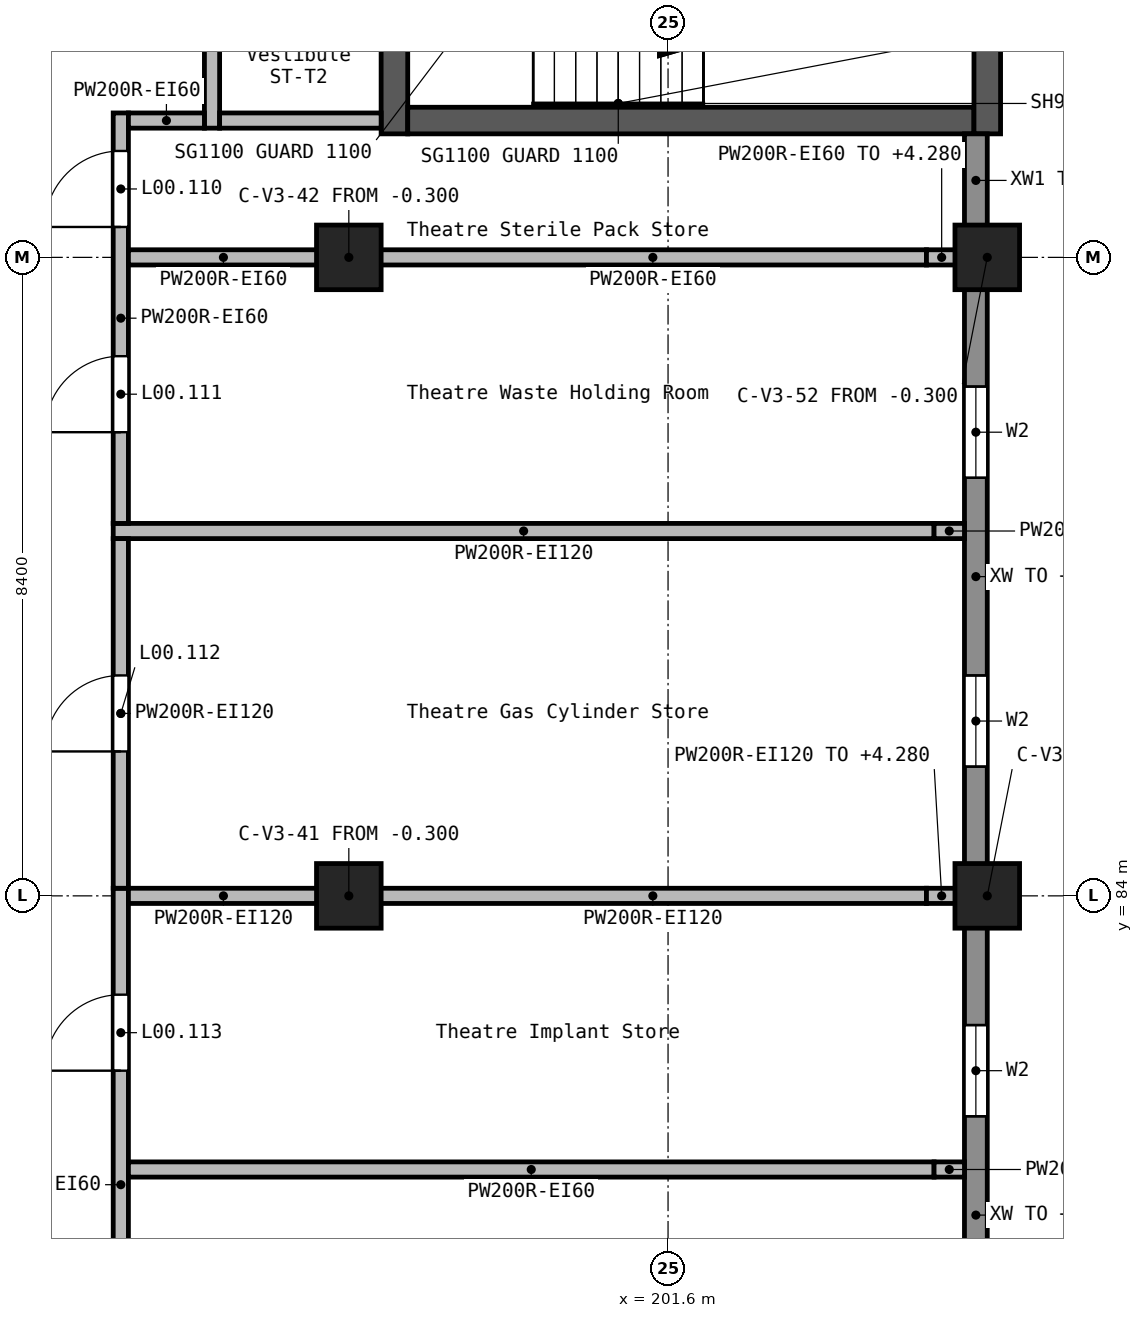
"""IFC4 building model, lengths in metres.
Left out: names, types, materials, properties, quantities, classifications, styles, units other than length and angle.
Written with IfcOpenShell. Run it as: python <this file> out.ifc"""

import sys

from ifc_helpers import new_model, si_unit, direction, frame, frame_2d, origin, origin_2d, place, context, subcontext, project, spatial, rectangle, extrude, element, fill, save


model = new_model("IFC4")
c1 = context("Model", 3, precision=1e-05, world=origin(), true_north=direction((0.0, 1.0)))
c2 = subcontext(c1, "Body", "Model", "MODEL_VIEW")
j1 = project(units=[si_unit("LENGTHUNIT", "METRE"), si_unit("PLANEANGLEUNIT", "RADIAN")], contexts=[c1])
p1 = place(None, origin())
s1 = spatial("IfcSite", under=j1, at=p1, CompositionType="ELEMENT")
p2 = place(p1, origin())
s2 = spatial("IfcBuilding", under=s1, at=p2, CompositionType="ELEMENT")
p3 = place(p2, origin())
s3 = spatial("IfcBuildingStorey", under=s2, at=p3, CompositionType="ELEMENT", Elevation=0.0)
for number, where, z_axis, x_axis in (
    (1, (197.4, 84.0, -0.3), (0.0, 0.0, 1.0), (1.0, 0.0, 0.0)),
    (2, (197.4, 92.4, -0.3), (0.0, 0.0, 1.0), (1.0, 0.0, 0.0)),
    (3, (205.8, 84.0, -0.3), (0.0, 0.0, 1.0), (1.0, 0.0, 0.0)),
    (4, (205.8, 92.4, -0.3), (0.0, 0.0, 1.0), (1.0, 0.0, 0.0)),
):
    element("IfcColumn", number, at=place(p3, frame(where, z_axis=z_axis, x_axis=x_axis)), inside=s3, PredefinedType="COLUMN", context=c2, shape_type="SweptSolid", body=[
        extrude(rectangle(XDim=0.85, YDim=0.85, at=origin_2d()), origin(), (0.0, 0.0, 1.0), 5.7),
    ])
p4 = place(p3, frame((198.0, 94.025, -0.3), z_axis=(0.0, 0.0, 1.0), x_axis=(0.0, 1.0, 0.0)))
e5 = element("IfcWall", 5, at=p4, inside=s3, PredefinedType="SHEAR", context=c2, shape_type="SweptSolid", body=[
    extrude(rectangle(XDim=4.8, YDim=0.35, at=frame_2d((2.4, 0.0))), origin(), (0.0, 0.0, 1.0), 5.7),
])
p5 = place(p4, frame((3.275, 0.0, 0.3)))
e6 = element("IfcOpeningElement", 6, at=p5, cuts=e5, PredefinedType="OPENING", context=c2, shape_type="SweptSolid", body=[
    extrude(rectangle(XDim=1.1, YDim=2.1, at=frame_2d((0.55, 1.05))), frame((0.0, 0.185, 0.0), z_axis=(0.0, -1.0, 0.0), x_axis=(1.0, 0.0, 0.0)), (0.0, 0.0, 1.0), 0.37),
])
p6 = place(p3, frame((198.175, 94.2, -0.3), z_axis=(0.0, 0.0, 1.0), x_axis=(1.0, 0.0, 0.0)))
e7 = element("IfcWall", 7, at=p6, inside=s3, PredefinedType="SHEAR", context=c2, shape_type="SweptSolid", body=[
    extrude(rectangle(XDim=7.45, YDim=0.35, at=frame_2d((3.725, 0.0))), origin(), (0.0, 0.0, 1.0), 5.7),
])
p7 = place(p3, frame((205.8, 94.025, -0.3), z_axis=(0.0, 0.0, 1.0), x_axis=(0.0, 1.0, 0.0)))
e8 = element("IfcWall", 8, at=p7, inside=s3, PredefinedType="SHEAR", context=c2, shape_type="SweptSolid", body=[
    extrude(rectangle(XDim=5.15, YDim=0.35, at=frame_2d((2.575, 0.0))), origin(), (0.0, 0.0, 1.0), 5.7),
])
p8 = place(p7, frame((1.875, 0.0, 0.3)))
e9 = element("IfcOpeningElement", 9, at=p8, cuts=e8, PredefinedType="OPENING", context=c2, shape_type="SweptSolid", body=[
    extrude(rectangle(XDim=1.4, YDim=2.1, at=frame_2d((0.7, 1.05))), frame((0.0, 0.185, 0.0), z_axis=(0.0, -1.0, 0.0), x_axis=(1.0, 0.0, 0.0)), (0.0, 0.0, 1.0), 0.37),
])
p9 = place(p3, frame((205.65, 76.0, 0.0), z_axis=(0.0, 0.0, 1.0), x_axis=(0.0, 1.0, 0.0)))
e10 = element("IfcWall", 10, at=p9, inside=s3, PredefinedType="STANDARD", context=c2, shape_type="SweptSolid", body=[
    extrude(rectangle(XDim=7.6, YDim=0.3, at=frame_2d((3.8, 0.0))), origin(), (0.0, 0.0, 1.0), 4.25),
])
p10 = place(p9, frame((1.3, 0.0, 1.2)))
e11 = element("IfcOpeningElement", 11, at=p10, cuts=e10, PredefinedType="OPENING", context=c2, shape_type="SweptSolid", body=[
    extrude(rectangle(XDim=1.2, YDim=1.2, at=frame_2d((0.6, 0.6))), frame((0.0, 0.16, 0.0), z_axis=(0.0, -1.0, 0.0), x_axis=(1.0, 0.0, 0.0)), (0.0, 0.0, 1.0), 0.32),
])
p11 = place(p9, frame((5.1, 0.0, 1.2)))
e12 = element("IfcOpeningElement", 12, at=p11, cuts=e10, PredefinedType="OPENING", context=c2, shape_type="SweptSolid", body=[
    extrude(rectangle(XDim=1.2, YDim=1.2, at=frame_2d((0.6, 0.6))), frame((0.0, 0.16, 0.0), z_axis=(0.0, -1.0, 0.0), x_axis=(1.0, 0.0, 0.0)), (0.0, 0.0, 1.0), 0.32),
])
p12 = place(p3, frame((205.65, 84.4, 0.0), z_axis=(0.0, 0.0, 1.0), x_axis=(0.0, 1.0, 0.0)))
e13 = element("IfcWall", 13, at=p12, inside=s3, PredefinedType="STANDARD", context=c2, shape_type="SweptSolid", body=[
    extrude(rectangle(XDim=7.6, YDim=0.3, at=frame_2d((3.8, 0.0))), origin(), (0.0, 0.0, 1.0), 4.25),
])
p13 = place(p12, frame((1.3, 0.0, 1.2)))
e14 = element("IfcOpeningElement", 14, at=p13, cuts=e13, PredefinedType="OPENING", context=c2, shape_type="SweptSolid", body=[
    extrude(rectangle(XDim=1.2, YDim=1.2, at=frame_2d((0.6, 0.6))), frame((0.0, 0.16, 0.0), z_axis=(0.0, -1.0, 0.0), x_axis=(1.0, 0.0, 0.0)), (0.0, 0.0, 1.0), 0.32),
])
p14 = place(p12, frame((5.1, 0.0, 1.2)))
e15 = element("IfcOpeningElement", 15, at=p14, cuts=e13, PredefinedType="OPENING", context=c2, shape_type="SweptSolid", body=[
    extrude(rectangle(XDim=1.2, YDim=1.2, at=frame_2d((0.6, 0.6))), frame((0.0, 0.16, 0.0), z_axis=(0.0, -1.0, 0.0), x_axis=(1.0, 0.0, 0.0)), (0.0, 0.0, 1.0), 0.32),
])
p15 = place(p3, frame((205.65, 92.8, 0.0), z_axis=(0.0, 0.0, 1.0), x_axis=(0.0, 1.0, 0.0)))
e16 = element("IfcWall", 16, at=p15, inside=s3, PredefinedType="STANDARD", context=c2, shape_type="SweptSolid", body=[
    extrude(rectangle(XDim=1.225, YDim=0.3, at=frame_2d((0.612, 0.0))), origin(), (0.0, 0.0, 1.0), 4.25),
])
p16 = place(p3, frame((194.4, 76.3, 0.0), z_axis=(0.0, 0.0, 1.0), x_axis=(0.0, 1.0, 0.0)))
e17 = element("IfcWall", 17, at=p16, inside=s3, PredefinedType="SOLIDWALL", context=c2, shape_type="SweptSolid", body=[
    extrude(rectangle(XDim=7.8, YDim=0.2, at=frame_2d((3.9, 0.0))), origin(), (0.0, 0.0, 1.0), 5.05),
])
p17 = place(p16, frame((5.4, 0.0, 0.0)))
e18 = element("IfcOpeningElement", 18, at=p17, cuts=e17, PredefinedType="OPENING", context=c2, shape_type="SweptSolid", body=[
    extrude(rectangle(XDim=1.0, YDim=2.1, at=frame_2d((0.5, 1.05))), frame((0.0, 0.11, 0.0), z_axis=(0.0, -1.0, 0.0), x_axis=(1.0, 0.0, 0.0)), (0.0, 0.0, 1.0), 0.22),
])
p18 = place(p16, frame((1.2, 0.0, 0.0)))
e19 = element("IfcOpeningElement", 19, at=p18, cuts=e17, PredefinedType="OPENING", context=c2, shape_type="SweptSolid", body=[
    extrude(rectangle(XDim=1.0, YDim=2.1, at=frame_2d((0.5, 1.05))), frame((0.0, 0.11, 0.0), z_axis=(0.0, -1.0, 0.0), x_axis=(1.0, 0.0, 0.0)), (0.0, 0.0, 1.0), 0.22),
])
p19 = place(p3, frame((194.5, 80.4, 0.0), z_axis=(0.0, 0.0, 1.0), x_axis=(1.0, 0.0, 0.0)))
e20 = element("IfcWall", 20, at=p19, inside=s3, PredefinedType="SOLIDWALL", context=c2, shape_type="SweptSolid", body=[
    extrude(rectangle(XDim=10.6, YDim=0.2, at=frame_2d((5.3, 0.0))), origin(), (0.0, 0.0, 1.0), 5.05),
])
p20 = place(p3, frame((205.1, 80.4, 0.0), z_axis=(0.0, 0.0, 1.0), x_axis=(1.0, 0.0, 0.0)))
e21 = element("IfcWall", 21, at=p20, inside=s3, PredefinedType="SOLIDWALL", context=c2, shape_type="SweptSolid", body=[
    extrude(rectangle(XDim=0.4, YDim=0.2, at=frame_2d((0.2, 0.0))), origin(), (0.0, 0.0, 1.0), 4.28),
])
p21 = place(p3, frame((194.5, 84.0, 0.0), z_axis=(0.0, 0.0, 1.0), x_axis=(1.0, 0.0, 0.0)))
e22 = element("IfcWall", 22, at=p21, inside=s3, PredefinedType="SOLIDWALL", context=c2, shape_type="SweptSolid", body=[
    extrude(rectangle(XDim=2.5, YDim=0.2, at=frame_2d((1.25, 0.0))), origin(), (0.0, 0.0, 1.0), 5.05),
])
p22 = place(p3, frame((197.8, 84.0, 0.0), z_axis=(0.0, 0.0, 1.0), x_axis=(1.0, 0.0, 0.0)))
e23 = element("IfcWall", 23, at=p22, inside=s3, PredefinedType="SOLIDWALL", context=c2, shape_type="SweptSolid", body=[
    extrude(rectangle(XDim=7.2, YDim=0.2, at=frame_2d((3.6, 0.0))), origin(), (0.0, 0.0, 1.0), 5.05),
])
p23 = place(p3, frame((205.0, 84.0, 0.0), z_axis=(0.0, 0.0, 1.0), x_axis=(1.0, 0.0, 0.0)))
e24 = element("IfcWall", 24, at=p23, inside=s3, PredefinedType="SOLIDWALL", context=c2, shape_type="SweptSolid", body=[
    extrude(rectangle(XDim=0.4, YDim=0.2, at=frame_2d((0.2, 0.0))), origin(), (0.0, 0.0, 1.0), 4.28),
])
p24 = place(p3, frame((194.3, 88.8, 0.0), z_axis=(0.0, 0.0, 1.0), x_axis=(1.0, 0.0, 0.0)))
e25 = element("IfcWall", 25, at=p24, inside=s3, PredefinedType="SOLIDWALL", context=c2, shape_type="SweptSolid", body=[
    extrude(rectangle(XDim=10.8, YDim=0.2, at=frame_2d((5.4, 0.0))), origin(), (0.0, 0.0, 1.0), 5.05),
])
p25 = place(p3, frame((205.1, 88.8, 0.0), z_axis=(0.0, 0.0, 1.0), x_axis=(1.0, 0.0, 0.0)))
e26 = element("IfcWall", 26, at=p25, inside=s3, PredefinedType="SOLIDWALL", context=c2, shape_type="SweptSolid", body=[
    extrude(rectangle(XDim=0.4, YDim=0.2, at=frame_2d((0.2, 0.0))), origin(), (0.0, 0.0, 1.0), 4.28),
])
p26 = place(p3, frame((194.4, 88.9, 0.0), z_axis=(0.0, 0.0, 1.0), x_axis=(0.0, 1.0, 0.0)))
e27 = element("IfcWall", 27, at=p26, inside=s3, PredefinedType="SOLIDWALL", context=c2, shape_type="SweptSolid", body=[
    extrude(rectangle(XDim=5.4, YDim=0.2, at=frame_2d((2.7, 0.0))), origin(), (0.0, 0.0, 1.0), 5.05),
])
p27 = place(p26, frame((3.9, 0.0, 0.0)))
e28 = element("IfcOpeningElement", 28, at=p27, cuts=e27, PredefinedType="OPENING", context=c2, shape_type="SweptSolid", body=[
    extrude(rectangle(XDim=1.0, YDim=2.1, at=frame_2d((0.5, 1.05))), frame((0.0, 0.11, 0.0), z_axis=(0.0, -1.0, 0.0), x_axis=(1.0, 0.0, 0.0)), (0.0, 0.0, 1.0), 0.22),
])
p28 = place(p26, frame((1.2, 0.0, 0.0)))
e29 = element("IfcOpeningElement", 29, at=p28, cuts=e27, PredefinedType="OPENING", context=c2, shape_type="SweptSolid", body=[
    extrude(rectangle(XDim=1.0, YDim=2.1, at=frame_2d((0.5, 1.05))), frame((0.0, 0.11, 0.0), z_axis=(0.0, -1.0, 0.0), x_axis=(1.0, 0.0, 0.0)), (0.0, 0.0, 1.0), 0.22),
])
p29 = place(p3, frame((194.5, 92.4, 0.0), z_axis=(0.0, 0.0, 1.0), x_axis=(1.0, 0.0, 0.0)))
e30 = element("IfcWall", 30, at=p29, inside=s3, PredefinedType="SOLIDWALL", context=c2, shape_type="SweptSolid", body=[
    extrude(rectangle(XDim=2.5, YDim=0.2, at=frame_2d((1.25, 0.0))), origin(), (0.0, 0.0, 1.0), 5.05),
])
p30 = place(p3, frame((197.8, 92.4, 0.0), z_axis=(0.0, 0.0, 1.0), x_axis=(1.0, 0.0, 0.0)))
e31 = element("IfcWall", 31, at=p30, inside=s3, PredefinedType="SOLIDWALL", context=c2, shape_type="SweptSolid", body=[
    extrude(rectangle(XDim=7.2, YDim=0.2, at=frame_2d((3.6, 0.0))), origin(), (0.0, 0.0, 1.0), 5.05),
])
p31 = place(p3, frame((205.0, 92.4, 0.0), z_axis=(0.0, 0.0, 1.0), x_axis=(1.0, 0.0, 0.0)))
e32 = element("IfcWall", 32, at=p31, inside=s3, PredefinedType="SOLIDWALL", context=c2, shape_type="SweptSolid", body=[
    extrude(rectangle(XDim=0.4, YDim=0.2, at=frame_2d((0.2, 0.0))), origin(), (0.0, 0.0, 1.0), 4.28),
])
p32 = place(p3, frame((194.4, 84.1, 0.0), z_axis=(0.0, 0.0, 1.0), x_axis=(0.0, 1.0, 0.0)))
e33 = element("IfcWall", 33, at=p32, inside=s3, PredefinedType="SOLIDWALL", context=c2, shape_type="SweptSolid", body=[
    extrude(rectangle(XDim=4.6, YDim=0.2, at=frame_2d((2.3, 0.0))), origin(), (0.0, 0.0, 1.0), 5.05),
])
p33 = place(p32, frame((1.8, 0.0, 0.0)))
e34 = element("IfcOpeningElement", 34, at=p33, cuts=e33, PredefinedType="OPENING", context=c2, shape_type="SweptSolid", body=[
    extrude(rectangle(XDim=1.0, YDim=2.1, at=frame_2d((0.5, 1.05))), frame((0.0, 0.11, 0.0), z_axis=(0.0, -1.0, 0.0), x_axis=(1.0, 0.0, 0.0)), (0.0, 0.0, 1.0), 0.22),
])
p34 = place(p3, frame((195.6, 94.1, 0.0), z_axis=(0.0, 0.0, 1.0), x_axis=(0.0, 1.0, 0.0)))
e35 = element("IfcWall", 35, at=p34, inside=s3, PredefinedType="SOLIDWALL", context=c2, shape_type="SweptSolid", body=[
    extrude(rectangle(XDim=5.0, YDim=0.2, at=frame_2d((2.5, 0.0))), origin(), (0.0, 0.0, 1.0), 5.05),
])
p35 = place(p34, frame((1.95, 0.0, 0.0)))
e36 = element("IfcOpeningElement", 36, at=p35, cuts=e35, PredefinedType="OPENING", context=c2, shape_type="SweptSolid", body=[
    extrude(rectangle(XDim=1.1, YDim=2.1, at=frame_2d((0.55, 1.05))), frame((0.0, 0.11, 0.0), z_axis=(0.0, -1.0, 0.0), x_axis=(1.0, 0.0, 0.0)), (0.0, 0.0, 1.0), 0.22),
])
p36 = place(p3, frame((195.7, 94.2, 0.0), z_axis=(0.0, 0.0, 1.0), x_axis=(1.0, 0.0, 0.0)))
e37 = element("IfcWall", 37, at=p36, inside=s3, PredefinedType="SOLIDWALL", context=c2, shape_type="SweptSolid", body=[
    extrude(rectangle(XDim=2.125, YDim=0.2, at=frame_2d((1.062, 0.0))), origin(), (0.0, 0.0, 1.0), 5.05),
])
p37 = place(p3, frame((194.5, 94.2, 0.0), z_axis=(0.0, 0.0, 1.0), x_axis=(1.0, 0.0, 0.0)))
e38 = element("IfcWall", 38, at=p37, inside=s3, PredefinedType="SOLIDWALL", context=c2, shape_type="SweptSolid", body=[
    extrude(rectangle(XDim=1.0, YDim=0.2, at=frame_2d((0.5, 0.0))), origin(), (0.0, 0.0, 1.0), 5.05),
])
p38 = place(p11, origin())
e39 = element("IfcWindow", 39, at=p38, inside=s3, PartitioningType="SINGLE_PANEL", PredefinedType="WINDOW", context=c2, shape_type="SweptSolid", body=[
    extrude(rectangle(XDim=1.2, YDim=1.2, at=frame_2d((0.6, 0.6))), frame((0.0, 0.03, 0.0), z_axis=(0.0, -1.0, 0.0), x_axis=(1.0, 0.0, 0.0)), (0.0, 0.0, 1.0), 0.06),
])
fill(e12, e39)
p39 = place(p13, origin())
e40 = element("IfcWindow", 40, at=p39, inside=s3, PartitioningType="SINGLE_PANEL", PredefinedType="WINDOW", context=c2, shape_type="SweptSolid", body=[
    extrude(rectangle(XDim=1.2, YDim=1.2, at=frame_2d((0.6, 0.6))), frame((0.0, 0.03, 0.0), z_axis=(0.0, -1.0, 0.0), x_axis=(1.0, 0.0, 0.0)), (0.0, 0.0, 1.0), 0.06),
])
fill(e14, e40)
p40 = place(p14, origin())
e41 = element("IfcWindow", 41, at=p40, inside=s3, PartitioningType="SINGLE_PANEL", PredefinedType="WINDOW", context=c2, shape_type="SweptSolid", body=[
    extrude(rectangle(XDim=1.2, YDim=1.2, at=frame_2d((0.6, 0.6))), frame((0.0, 0.03, 0.0), z_axis=(0.0, -1.0, 0.0), x_axis=(1.0, 0.0, 0.0)), (0.0, 0.0, 1.0), 0.06),
])
fill(e15, e41)
p41 = place(p27, frame((1.0, 0.0, 0.0), z_axis=(0.0, 0.0, 1.0), x_axis=(-1.0, 0.0, 0.0)))
e42 = element("IfcDoor", 42, at=p41, inside=s3, OperationType="SINGLE_SWING_LEFT", PredefinedType="DOOR", context=c2, shape_type="SweptSolid", body=[
    extrude(rectangle(XDim=1.0, YDim=2.1, at=frame_2d((0.5, 1.05))), frame((0.0, 0.025, 0.0), z_axis=(0.0, -1.0, 0.0), x_axis=(1.0, 0.0, 0.0)), (0.0, 0.0, 1.0), 0.05),
])
fill(e28, e42)
p42 = place(p28, frame((1.0, 0.0, 0.0), z_axis=(0.0, 0.0, 1.0), x_axis=(-1.0, 0.0, 0.0)))
e43 = element("IfcDoor", 43, at=p42, inside=s3, OperationType="SINGLE_SWING_RIGHT", PredefinedType="DOOR", context=c2, shape_type="SweptSolid", body=[
    extrude(rectangle(XDim=1.0, YDim=2.1, at=frame_2d((0.5, 1.05))), frame((0.0, 0.025, 0.0), z_axis=(0.0, -1.0, 0.0), x_axis=(1.0, 0.0, 0.0)), (0.0, 0.0, 1.0), 0.05),
])
fill(e29, e43)
p43 = place(p33, frame((1.0, 0.0, 0.0), z_axis=(0.0, 0.0, 1.0), x_axis=(-1.0, 0.0, 0.0)))
e44 = element("IfcDoor", 44, at=p43, inside=s3, OperationType="SINGLE_SWING_RIGHT", PredefinedType="DOOR", context=c2, shape_type="SweptSolid", body=[
    extrude(rectangle(XDim=1.0, YDim=2.1, at=frame_2d((0.5, 1.05))), frame((0.0, 0.025, 0.0), z_axis=(0.0, -1.0, 0.0), x_axis=(1.0, 0.0, 0.0)), (0.0, 0.0, 1.0), 0.05),
])
fill(e34, e44)
p44 = place(p17, frame((1.0, 0.0, 0.0), z_axis=(0.0, 0.0, 1.0), x_axis=(-1.0, 0.0, 0.0)))
e45 = element("IfcDoor", 45, at=p44, inside=s3, OperationType="SINGLE_SWING_LEFT", PredefinedType="DOOR", context=c2, shape_type="SweptSolid", body=[
    extrude(rectangle(XDim=1.0, YDim=2.1, at=frame_2d((0.5, 1.05))), frame((0.0, 0.025, 0.0), z_axis=(0.0, -1.0, 0.0), x_axis=(1.0, 0.0, 0.0)), (0.0, 0.0, 1.0), 0.05),
])
fill(e18, e45)
save(model, sys.argv[1])
